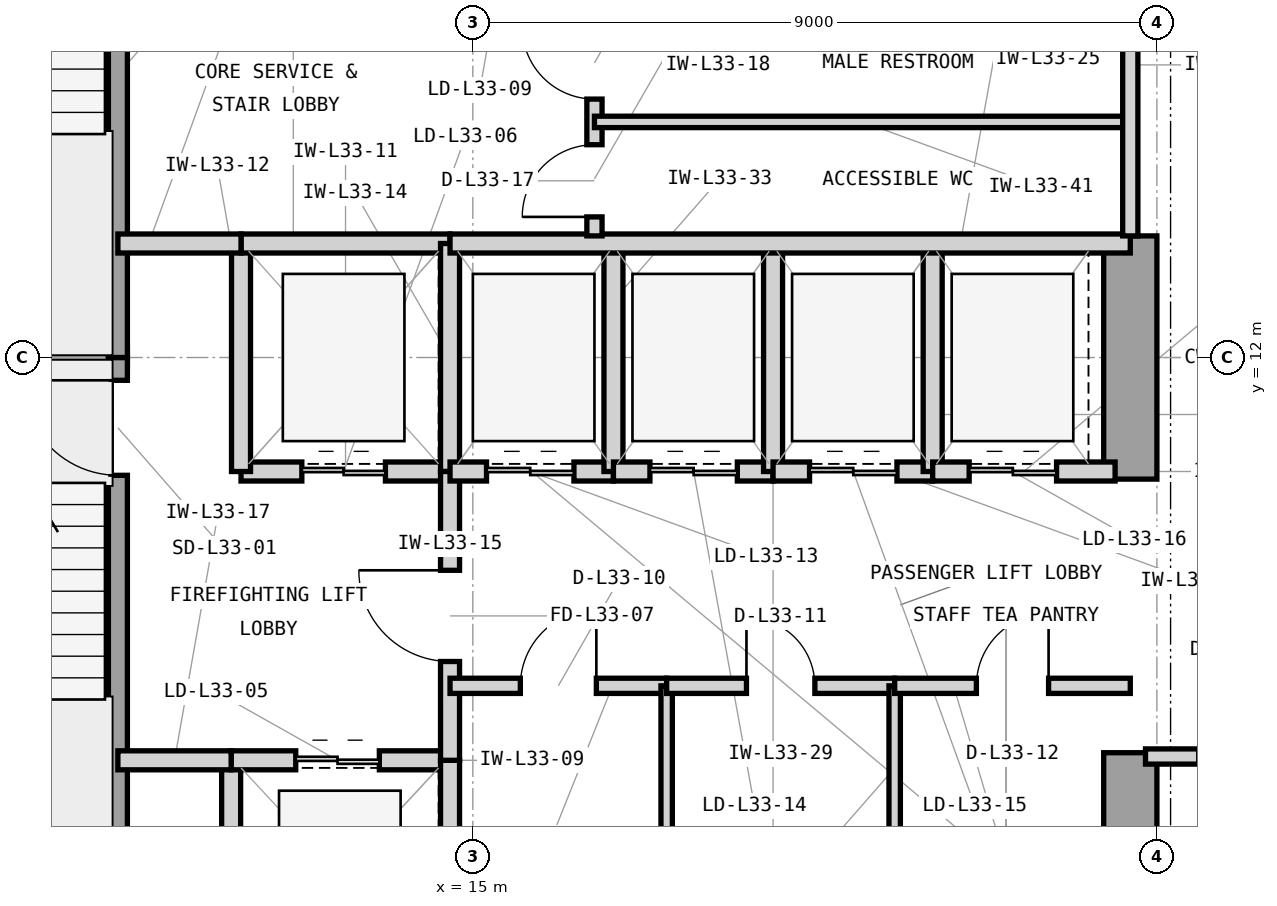
"""IFC4 building model, lengths in metres.
Left out: names, types, materials, properties, quantities, classifications, styles, units other than length and angle.
Written with IfcOpenShell. Run it as: python <this file> out.ifc"""

import sys

from ifc_helpers import new_model, si_unit, direction, frame, frame_2d, origin, place, context, subcontext, project, spatial, rectangle, extrude, element, fill, save


model = new_model("IFC4")
c1 = context("Model", 3, precision=1e-05, world=origin(), true_north=direction((0.0, 1.0)))
c2 = subcontext(c1, "Body", "Model", "MODEL_VIEW")
j1 = project(units=[si_unit("LENGTHUNIT", "METRE"), si_unit("PLANEANGLEUNIT", "RADIAN")], contexts=[c1])
p1 = place(None, origin())
s1 = spatial("IfcSite", under=j1, at=p1, CompositionType="ELEMENT")
p2 = place(p1, origin())
s2 = spatial("IfcBuilding", under=s1, at=p2, CompositionType="ELEMENT")
p3 = place(p2, frame((0.0, 0.0, 140.1)))
s3 = spatial("IfcBuildingStorey", under=s2, at=p3, CompositionType="ELEMENT", Elevation=140.1)
p4 = place(p3, frame((23.65, 3.7, 0.0), z_axis=(0.0, 0.0, 1.0), x_axis=(0.0, 1.0, 0.0)))
e1 = element("IfcWall", 1, at=p4, inside=s3, PredefinedType="SHEAR", context=c2, shape_type="SweptSolid", body=[
    extrude(rectangle(XDim=3.1, YDim=0.7, at=frame_2d((1.55, 0.0))), origin(), (0.0, 0.0, 1.0), 3.9),
])
p5 = place(p3, frame((23.65, 10.4, 0.0), z_axis=(0.0, 0.0, 1.0), x_axis=(0.0, 1.0, 0.0)))
e2 = element("IfcWall", 2, at=p5, inside=s3, PredefinedType="SHEAR", context=c2, shape_type="SweptSolid", body=[
    extrude(rectangle(XDim=3.2, YDim=0.7, at=frame_2d((1.6, 0.0))), origin(), (0.0, 0.0, 1.0), 3.9),
])
p6 = place(p3, frame((6.35, 12.0, 0.0), z_axis=(0.0, 0.0, 1.0), x_axis=(1.0, 0.0, 0.0)))
e3 = element("IfcWall", 3, at=p6, inside=s3, PredefinedType="SHEAR", context=c2, shape_type="SweptSolid", body=[
    extrude(rectangle(XDim=4.105, YDim=0.25, at=frame_2d((2.052, 0.0))), origin(), (0.0, 0.0, 1.0), 3.9),
])
p7 = place(p3, frame((10.33, 4.55, 0.0), z_axis=(0.0, 0.0, 1.0), x_axis=(0.0, 1.0, 0.0)))
e4 = element("IfcWall", 4, at=p7, inside=s3, PredefinedType="SHEAR", context=c2, shape_type="SweptSolid", body=[
    extrude(rectangle(XDim=7.45, YDim=0.25, at=frame_2d((3.725, 0.0))), origin(), (0.0, 0.0, 1.0), 3.9),
])
p8 = place(p7, frame((5.9, 0.0, 0.0)))
e5 = element("IfcOpeningElement", 5, at=p8, cuts=e4, PredefinedType="OPENING", context=c2, shape_type="SweptSolid", body=[
    extrude(rectangle(XDim=1.25, YDim=2.2, at=frame_2d((0.625, 1.1))), frame((0.0, 0.135, 0.0), z_axis=(0.0, -1.0, 0.0), x_axis=(1.0, 0.0, 0.0)), (0.0, 0.0, 1.0), 0.27),
])
p9 = place(p3, frame((10.33, 12.0, 0.0), z_axis=(0.0, 0.0, 1.0), x_axis=(0.0, 1.0, 0.0)))
e6 = element("IfcWall", 6, at=p9, inside=s3, PredefinedType="SHEAR", context=c2, shape_type="SweptSolid", body=[
    extrude(rectangle(XDim=7.45, YDim=0.25, at=frame_2d((3.725, 0.0))), origin(), (0.0, 0.0, 1.0), 3.9),
])
p10 = place(p9, frame((5.85, 0.0, 0.0)))
e7 = element("IfcOpeningElement", 7, at=p10, cuts=e6, PredefinedType="OPENING", context=c2, shape_type="SweptSolid", body=[
    extrude(rectangle(XDim=1.25, YDim=2.2, at=frame_2d((0.625, 1.1))), frame((0.0, 0.135, 0.0), z_axis=(0.0, -1.0, 0.0), x_axis=(1.0, 0.0, 0.0)), (0.0, 0.0, 1.0), 0.27),
])
p11 = place(p3, frame((11.82, 3.35, 0.0), z_axis=(0.0, 0.0, 1.0), x_axis=(0.0, 1.0, 0.0)))
e8 = element("IfcWall", 8, at=p11, inside=s3, PredefinedType="PARTITIONING", context=c2, shape_type="SweptSolid", body=[
    extrude(rectangle(XDim=3.35, YDim=0.25, at=frame_2d((1.675, 0.0))), origin(), (0.0, 0.0, 1.0), 3.69),
])
p12 = place(p3, frame((11.82, 6.7, 0.0), z_axis=(0.0, 0.0, 1.0), x_axis=(1.0, 0.0, 0.0)))
e9 = element("IfcWall", 9, at=p12, inside=s3, PredefinedType="PARTITIONING", context=c2, shape_type="SweptSolid", body=[
    extrude(rectangle(XDim=2.88, YDim=0.25, at=frame_2d((1.44, 0.0))), origin(), (0.0, 0.0, 1.0), 3.233),
])
p13 = place(p12, frame((0.85, 0.0, 0.0)))
e10 = element("IfcOpeningElement", 10, at=p13, cuts=e9, PredefinedType="OPENING", context=c2, shape_type="SweptSolid", body=[
    extrude(rectangle(XDim=1.1, YDim=2.25, at=frame_2d((0.55, 1.125))), frame((0.0, 0.135, 0.0), z_axis=(0.0, -1.0, 0.0), x_axis=(1.0, 0.0, 0.0)), (0.0, 0.0, 1.0), 0.27),
])
p14 = place(p3, frame((14.7, 3.35, 0.0), z_axis=(0.0, 0.0, 1.0), x_axis=(0.0, 1.0, 0.0)))
e11 = element("IfcWall", 11, at=p14, inside=s3, PredefinedType="PARTITIONING", context=c2, shape_type="SweptSolid", body=[
    extrude(rectangle(XDim=3.35, YDim=0.25, at=frame_2d((1.675, 0.0))), origin(), (0.0, 0.0, 1.0), 3.69),
])
p15 = place(p3, frame((11.95, 10.5, 0.0), z_axis=(0.0, 0.0, 1.0), x_axis=(1.0, 0.0, 0.0)))
e12 = element("IfcWall", 12, at=p15, inside=s3, PredefinedType="PARTITIONING", context=c2, shape_type="SweptSolid", body=[
    extrude(rectangle(XDim=2.75, YDim=0.25, at=frame_2d((1.375, 0.0))), origin(), (0.0, 0.0, 1.0), 3.233),
])
p16 = place(p15, frame((0.8, 0.0, 0.0)))
e13 = element("IfcOpeningElement", 13, at=p16, cuts=e12, PredefinedType="OPENING", context=c2, shape_type="SweptSolid", body=[
    extrude(rectangle(XDim=1.1, YDim=2.25, at=frame_2d((0.55, 1.125))), frame((0.0, 0.135, 0.0), z_axis=(0.0, -1.0, 0.0), x_axis=(1.0, 0.0, 0.0)), (0.0, 0.0, 1.0), 0.27),
])
p17 = place(p3, frame((11.95, 10.5, 0.0), z_axis=(0.0, 0.0, 1.0), x_axis=(0.0, 1.0, 0.0)))
e14 = element("IfcWall", 14, at=p17, inside=s3, PredefinedType="PARTITIONING", context=c2, shape_type="SweptSolid", body=[
    extrude(rectangle(XDim=3.0, YDim=0.25, at=frame_2d((1.5, 0.0))), origin(), (0.0, 0.0, 1.0), 3.69),
])
p18 = place(p3, frame((11.95, 13.5, 0.0), z_axis=(0.0, 0.0, 1.0), x_axis=(1.0, 0.0, 0.0)))
e15 = element("IfcWall", 15, at=p18, inside=s3, PredefinedType="PARTITIONING", context=c2, shape_type="SweptSolid", body=[
    extrude(rectangle(XDim=2.75, YDim=0.25, at=frame_2d((1.375, 0.0))), origin(), (0.0, 0.0, 1.0), 3.233),
])
p19 = place(p3, frame((14.7, 10.5, 0.0), z_axis=(0.0, 0.0, 1.0), x_axis=(0.0, 1.0, 0.0)))
e16 = element("IfcWall", 16, at=p19, inside=s3, PredefinedType="PARTITIONING", context=c2, shape_type="SweptSolid", body=[
    extrude(rectangle(XDim=3.0, YDim=0.25, at=frame_2d((1.5, 0.0))), origin(), (0.0, 0.0, 1.0), 3.69),
])
p20 = place(p3, frame((14.7, 6.7, 0.0), z_axis=(0.0, 0.0, 1.0), x_axis=(0.0, 1.0, 0.0)))
e17 = element("IfcWall", 17, at=p20, inside=s3, PredefinedType="PARTITIONING", context=c2, shape_type="SweptSolid", body=[
    extrude(rectangle(XDim=3.8, YDim=0.25, at=frame_2d((1.9, 0.0))), origin(), (0.0, 0.0, 1.0), 3.69),
])
p21 = place(p20, frame((1.3, 0.0, 0.0)))
e18 = element("IfcOpeningElement", 18, at=p21, cuts=e17, PredefinedType="OPENING", context=c2, shape_type="SweptSolid", body=[
    extrude(rectangle(XDim=1.2, YDim=2.2, at=frame_2d((0.6, 1.1))), frame((0.0, 0.135, 0.0), z_axis=(0.0, -1.0, 0.0), x_axis=(1.0, 0.0, 0.0)), (0.0, 0.0, 1.0), 0.27),
])
p22 = place(p3, frame((10.33, 13.5, 0.0), z_axis=(0.0, 0.0, 1.0), x_axis=(1.0, 0.0, 0.0)))
e19 = element("IfcWall", 19, at=p22, inside=s3, PredefinedType="PARTITIONING", context=c2, shape_type="SweptSolid", body=[
    extrude(rectangle(XDim=1.62, YDim=0.25, at=frame_2d((0.81, 0.0))), origin(), (0.0, 0.0, 1.0), 3.233),
])
p23 = place(p3, frame((10.33, 6.7, 0.0), z_axis=(0.0, 0.0, 1.0), x_axis=(1.0, 0.0, 0.0)))
e20 = element("IfcWall", 20, at=p23, inside=s3, PredefinedType="PARTITIONING", context=c2, shape_type="SweptSolid", body=[
    extrude(rectangle(XDim=1.49, YDim=0.25, at=frame_2d((0.745, 0.0))), origin(), (0.0, 0.0, 1.0), 3.233),
])
p24 = place(p3, frame((14.7, 7.68, 0.0), z_axis=(0.0, 0.0, 1.0), x_axis=(1.0, 0.0, 0.0)))
e21 = element("IfcWall", 21, at=p24, inside=s3, PredefinedType="PARTITIONING", context=c2, shape_type="SweptSolid", body=[
    extrude(rectangle(XDim=2.85, YDim=0.2, at=frame_2d((1.425, 0.0))), origin(), (0.0, 0.0, 1.0), 3.69),
])
p25 = place(p24, frame((0.925, 0.0, 0.0)))
e22 = element("IfcOpeningElement", 22, at=p25, cuts=e21, PredefinedType="OPENING", context=c2, shape_type="SweptSolid", body=[
    extrude(rectangle(XDim=1.0, YDim=2.15, at=frame_2d((0.5, 1.075))), frame((0.0, 0.11, 0.0), z_axis=(0.0, -1.0, 0.0), x_axis=(1.0, 0.0, 0.0)), (0.0, 0.0, 1.0), 0.22),
])
p26 = place(p3, frame((17.55, 3.35, 0.0), z_axis=(0.0, 0.0, 1.0), x_axis=(0.0, 1.0, 0.0)))
e23 = element("IfcWall", 23, at=p26, inside=s3, PredefinedType="PARTITIONING", context=c2, shape_type="SweptSolid", body=[
    extrude(rectangle(XDim=4.33, YDim=0.15, at=frame_2d((2.165, 0.0))), origin(), (0.0, 0.0, 1.0), 3.69),
])
p27 = place(p3, frame((17.55, 7.68, 0.0), z_axis=(0.0, 0.0, 1.0), x_axis=(1.0, 0.0, 0.0)))
e24 = element("IfcWall", 24, at=p27, inside=s3, PredefinedType="PARTITIONING", context=c2, shape_type="SweptSolid", body=[
    extrude(rectangle(XDim=3.0, YDim=0.2, at=frame_2d((1.5, 0.0))), origin(), (0.0, 0.0, 1.0), 3.69),
])
p28 = place(p27, frame((1.05, 0.0, 0.0)))
e25 = element("IfcOpeningElement", 25, at=p28, cuts=e24, PredefinedType="OPENING", context=c2, shape_type="SweptSolid", body=[
    extrude(rectangle(XDim=0.9, YDim=2.1, at=frame_2d((0.45, 1.05))), frame((0.0, 0.11, 0.0), z_axis=(0.0, -1.0, 0.0), x_axis=(1.0, 0.0, 0.0)), (0.0, 0.0, 1.0), 0.22),
])
p29 = place(p3, frame((20.55, 3.35, 0.0), z_axis=(0.0, 0.0, 1.0), x_axis=(0.0, 1.0, 0.0)))
e26 = element("IfcWall", 26, at=p29, inside=s3, PredefinedType="PARTITIONING", context=c2, shape_type="SweptSolid", body=[
    extrude(rectangle(XDim=4.33, YDim=0.15, at=frame_2d((2.165, 0.0))), origin(), (0.0, 0.0, 1.0), 3.69),
])
p30 = place(p3, frame((20.55, 7.68, 0.0), z_axis=(0.0, 0.0, 1.0), x_axis=(1.0, 0.0, 0.0)))
e27 = element("IfcWall", 27, at=p30, inside=s3, PredefinedType="PARTITIONING", context=c2, shape_type="SweptSolid", body=[
    extrude(rectangle(XDim=3.1, YDim=0.2, at=frame_2d((1.55, 0.0))), origin(), (0.0, 0.0, 1.0), 3.69),
])
p31 = place(p30, frame((1.075, 0.0, 0.0)))
e28 = element("IfcOpeningElement", 28, at=p31, cuts=e27, PredefinedType="OPENING", context=c2, shape_type="SweptSolid", body=[
    extrude(rectangle(XDim=0.95, YDim=2.1, at=frame_2d((0.475, 1.05))), frame((0.0, 0.11, 0.0), z_axis=(0.0, -1.0, 0.0), x_axis=(1.0, 0.0, 0.0)), (0.0, 0.0, 1.0), 0.22),
])
p32 = place(p3, frame((14.7, 10.5, 0.0), z_axis=(0.0, 0.0, 1.0), x_axis=(1.0, 0.0, 0.0)))
e29 = element("IfcWall", 29, at=p32, inside=s3, PredefinedType="PARTITIONING", context=c2, shape_type="SweptSolid", body=[
    extrude(rectangle(XDim=2.15, YDim=0.25, at=frame_2d((1.075, 0.0))), origin(), (0.0, 0.0, 1.0), 3.233),
])
p33 = place(p32, frame((0.48, 0.0, 0.0)))
e30 = element("IfcOpeningElement", 30, at=p33, cuts=e29, PredefinedType="OPENING", context=c2, shape_type="SweptSolid", body=[
    extrude(rectangle(XDim=1.15, YDim=2.25, at=frame_2d((0.575, 1.125))), frame((0.0, 0.135, 0.0), z_axis=(0.0, -1.0, 0.0), x_axis=(1.0, 0.0, 0.0)), (0.0, 0.0, 1.0), 0.27),
])
p34 = place(p3, frame((16.85, 10.5, 0.0), z_axis=(0.0, 0.0, 1.0), x_axis=(0.0, 1.0, 0.0)))
e31 = element("IfcWall", 31, at=p34, inside=s3, PredefinedType="PARTITIONING", context=c2, shape_type="SweptSolid", body=[
    extrude(rectangle(XDim=3.0, YDim=0.25, at=frame_2d((1.5, 0.0))), origin(), (0.0, 0.0, 1.0), 3.69),
])
p35 = place(p3, frame((16.85, 10.5, 0.0), z_axis=(0.0, 0.0, 1.0), x_axis=(1.0, 0.0, 0.0)))
e32 = element("IfcWall", 32, at=p35, inside=s3, PredefinedType="PARTITIONING", context=c2, shape_type="SweptSolid", body=[
    extrude(rectangle(XDim=2.1, YDim=0.25, at=frame_2d((1.05, 0.0))), origin(), (0.0, 0.0, 1.0), 3.233),
])
p36 = place(p35, frame((0.48, 0.0, 0.0)))
e33 = element("IfcOpeningElement", 33, at=p36, cuts=e32, PredefinedType="OPENING", context=c2, shape_type="SweptSolid", body=[
    extrude(rectangle(XDim=1.15, YDim=2.25, at=frame_2d((0.575, 1.125))), frame((0.0, 0.135, 0.0), z_axis=(0.0, -1.0, 0.0), x_axis=(1.0, 0.0, 0.0)), (0.0, 0.0, 1.0), 0.27),
])
p37 = place(p3, frame((18.95, 10.5, 0.0), z_axis=(0.0, 0.0, 1.0), x_axis=(0.0, 1.0, 0.0)))
e34 = element("IfcWall", 34, at=p37, inside=s3, PredefinedType="PARTITIONING", context=c2, shape_type="SweptSolid", body=[
    extrude(rectangle(XDim=3.0, YDim=0.25, at=frame_2d((1.5, 0.0))), origin(), (0.0, 0.0, 1.0), 3.69),
])
p38 = place(p3, frame((18.95, 10.5, 0.0), z_axis=(0.0, 0.0, 1.0), x_axis=(1.0, 0.0, 0.0)))
e35 = element("IfcWall", 35, at=p38, inside=s3, PredefinedType="PARTITIONING", context=c2, shape_type="SweptSolid", body=[
    extrude(rectangle(XDim=2.1, YDim=0.25, at=frame_2d((1.05, 0.0))), origin(), (0.0, 0.0, 1.0), 3.233),
])
p39 = place(p38, frame((0.48, 0.0, 0.0)))
e36 = element("IfcOpeningElement", 36, at=p39, cuts=e35, PredefinedType="OPENING", context=c2, shape_type="SweptSolid", body=[
    extrude(rectangle(XDim=1.15, YDim=2.25, at=frame_2d((0.575, 1.125))), frame((0.0, 0.135, 0.0), z_axis=(0.0, -1.0, 0.0), x_axis=(1.0, 0.0, 0.0)), (0.0, 0.0, 1.0), 0.27),
])
p40 = place(p3, frame((21.05, 10.5, 0.0), z_axis=(0.0, 0.0, 1.0), x_axis=(0.0, 1.0, 0.0)))
e37 = element("IfcWall", 37, at=p40, inside=s3, PredefinedType="PARTITIONING", context=c2, shape_type="SweptSolid", body=[
    extrude(rectangle(XDim=3.0, YDim=0.25, at=frame_2d((1.5, 0.0))), origin(), (0.0, 0.0, 1.0), 3.69),
])
p41 = place(p3, frame((21.05, 10.5, 0.0), z_axis=(0.0, 0.0, 1.0), x_axis=(1.0, 0.0, 0.0)))
e38 = element("IfcWall", 38, at=p41, inside=s3, PredefinedType="PARTITIONING", context=c2, shape_type="SweptSolid", body=[
    extrude(rectangle(XDim=2.4, YDim=0.25, at=frame_2d((1.2, 0.0))), origin(), (0.0, 0.0, 1.0), 3.233),
])
p42 = place(p41, frame((0.48, 0.0, 0.0)))
e39 = element("IfcOpeningElement", 39, at=p42, cuts=e38, PredefinedType="OPENING", context=c2, shape_type="SweptSolid", body=[
    extrude(rectangle(XDim=1.15, YDim=2.25, at=frame_2d((0.575, 1.125))), frame((0.0, 0.135, 0.0), z_axis=(0.0, -1.0, 0.0), x_axis=(1.0, 0.0, 0.0)), (0.0, 0.0, 1.0), 0.27),
])
p43 = place(p3, frame((14.7, 13.5, 0.0), z_axis=(0.0, 0.0, 1.0), x_axis=(1.0, 0.0, 0.0)))
e40 = element("IfcWall", 40, at=p43, inside=s3, PredefinedType="PARTITIONING", context=c2, shape_type="SweptSolid", body=[
    extrude(rectangle(XDim=8.95, YDim=0.25, at=frame_2d((4.475, 0.0))), origin(), (0.0, 0.0, 1.0), 3.233),
])
p44 = place(p3, frame((16.6, 13.6, 0.0), z_axis=(0.0, 0.0, 1.0), x_axis=(0.0, 1.0, 0.0)))
e41 = element("IfcWall", 41, at=p44, inside=s3, PredefinedType="PARTITIONING", context=c2, shape_type="SweptSolid", body=[
    extrude(rectangle(XDim=3.0, YDim=0.2, at=frame_2d((1.5, 0.0))), origin(), (0.0, 0.0, 1.0), 3.69),
])
p45 = place(p44, frame((0.25, 0.0, 0.0)))
e42 = element("IfcOpeningElement", 42, at=p45, cuts=e41, PredefinedType="OPENING", context=c2, shape_type="SweptSolid", body=[
    extrude(rectangle(XDim=0.95, YDim=2.1, at=frame_2d((0.475, 1.05))), frame((0.0, 0.11, 0.0), z_axis=(0.0, -1.0, 0.0), x_axis=(1.0, 0.0, 0.0)), (0.0, 0.0, 1.0), 0.22),
])
p46 = place(p44, frame((1.8, 0.0, 0.0)))
e43 = element("IfcOpeningElement", 43, at=p46, cuts=e41, PredefinedType="OPENING", context=c2, shape_type="SweptSolid", body=[
    extrude(rectangle(XDim=0.95, YDim=2.1, at=frame_2d((0.475, 1.05))), frame((0.0, 0.11, 0.0), z_axis=(0.0, -1.0, 0.0), x_axis=(1.0, 0.0, 0.0)), (0.0, 0.0, 1.0), 0.22),
])
p47 = place(p3, frame((16.6, 15.1, 0.0), z_axis=(0.0, 0.0, 1.0), x_axis=(1.0, 0.0, 0.0)))
e44 = element("IfcWall", 44, at=p47, inside=s3, PredefinedType="PARTITIONING", context=c2, shape_type="SweptSolid", body=[
    extrude(rectangle(XDim=7.05, YDim=0.15, at=frame_2d((3.525, 0.0))), origin(), (0.0, 0.0, 1.0), 3.69),
])
p48 = place(p3, frame((23.65, 13.6, 0.0), z_axis=(0.0, 0.0, 1.0), x_axis=(0.0, 1.0, 0.0)))
e45 = element("IfcWall", 45, at=p48, inside=s3, PredefinedType="PARTITIONING", context=c2, shape_type="SweptSolid", body=[
    extrude(rectangle(XDim=3.0, YDim=0.2, at=frame_2d((1.5, 0.0))), origin(), (0.0, 0.0, 1.0), 3.69),
])
p49 = place(p3, frame((23.85, 6.75, 0.0), z_axis=(0.0, 0.0, 1.0), x_axis=(1.0, 0.0, 0.0)))
e46 = element("IfcWall", 46, at=p49, inside=s3, PredefinedType="PARTITIONING", context=c2, shape_type="SweptSolid", body=[
    extrude(rectangle(XDim=2.85, YDim=0.2, at=frame_2d((1.425, 0.0))), origin(), (0.0, 0.0, 1.0), 3.69),
])
p50 = place(p49, frame((0.7, 0.0, 0.0)))
e47 = element("IfcOpeningElement", 47, at=p50, cuts=e46, PredefinedType="OPENING", context=c2, shape_type="SweptSolid", body=[
    extrude(rectangle(XDim=1.0, YDim=2.15, at=frame_2d((0.5, 1.075))), frame((0.0, 0.11, 0.0), z_axis=(0.0, -1.0, 0.0), x_axis=(1.0, 0.0, 0.0)), (0.0, 0.0, 1.0), 0.22),
])
p51 = place(p8, origin())
e48 = element("IfcDoor", 48, at=p51, inside=s3, OperationType="SINGLE_SWING_RIGHT", PredefinedType="DOOR", context=c2, shape_type="SweptSolid", body=[
    extrude(rectangle(XDim=1.25, YDim=2.2, at=frame_2d((0.625, 1.1))), frame((0.0, 0.025, 0.0), z_axis=(0.0, -1.0, 0.0), x_axis=(1.0, 0.0, 0.0)), (0.0, 0.0, 1.0), 0.05),
])
fill(e5, e48)
p52 = place(p13, origin())
e49 = element("IfcDoor", 49, at=p52, inside=s3, OperationType="DOUBLE_DOOR_SLIDING", PredefinedType="DOOR", context=c2, shape_type="SweptSolid", body=[
    extrude(rectangle(XDim=1.1, YDim=2.25, at=frame_2d((0.55, 1.125))), frame((0.0, 0.025, 0.0), z_axis=(0.0, -1.0, 0.0), x_axis=(1.0, 0.0, 0.0)), (0.0, 0.0, 1.0), 0.05),
])
fill(e10, e49)
p53 = place(p16, origin())
e50 = element("IfcDoor", 50, at=p53, inside=s3, OperationType="DOUBLE_DOOR_SLIDING", PredefinedType="DOOR", context=c2, shape_type="SweptSolid", body=[
    extrude(rectangle(XDim=1.1, YDim=2.25, at=frame_2d((0.55, 1.125))), frame((0.0, 0.025, 0.0), z_axis=(0.0, -1.0, 0.0), x_axis=(1.0, 0.0, 0.0)), (0.0, 0.0, 1.0), 0.05),
])
fill(e13, e50)
p54 = place(p21, origin())
e51 = element("IfcDoor", 51, at=p54, inside=s3, OperationType="SINGLE_SWING_RIGHT", PredefinedType="DOOR", context=c2, shape_type="SweptSolid", body=[
    extrude(rectangle(XDim=1.2, YDim=2.2, at=frame_2d((0.6, 1.1))), frame((0.0, 0.025, 0.0), z_axis=(0.0, -1.0, 0.0), x_axis=(1.0, 0.0, 0.0)), (0.0, 0.0, 1.0), 0.05),
])
fill(e18, e51)
p55 = place(p25, origin())
e52 = element("IfcDoor", 52, at=p55, inside=s3, OperationType="SINGLE_SWING_RIGHT", PredefinedType="DOOR", context=c2, shape_type="SweptSolid", body=[
    extrude(rectangle(XDim=1.0, YDim=2.15, at=frame_2d((0.5, 1.075))), frame((0.0, 0.025, 0.0), z_axis=(0.0, -1.0, 0.0), x_axis=(1.0, 0.0, 0.0)), (0.0, 0.0, 1.0), 0.05),
])
fill(e22, e52)
p56 = place(p28, origin())
e53 = element("IfcDoor", 53, at=p56, inside=s3, OperationType="SINGLE_SWING_LEFT", PredefinedType="TRAPDOOR", context=c2, shape_type="SweptSolid", body=[
    extrude(rectangle(XDim=0.9, YDim=2.1, at=frame_2d((0.45, 1.05))), frame((0.0, 0.025, 0.0), z_axis=(0.0, -1.0, 0.0), x_axis=(1.0, 0.0, 0.0)), (0.0, 0.0, 1.0), 0.05),
])
fill(e25, e53)
p57 = place(p31, origin())
e54 = element("IfcDoor", 54, at=p57, inside=s3, OperationType="SINGLE_SWING_RIGHT", PredefinedType="DOOR", context=c2, shape_type="SweptSolid", body=[
    extrude(rectangle(XDim=0.95, YDim=2.1, at=frame_2d((0.475, 1.05))), frame((0.0, 0.025, 0.0), z_axis=(0.0, -1.0, 0.0), x_axis=(1.0, 0.0, 0.0)), (0.0, 0.0, 1.0), 0.05),
])
fill(e28, e54)
p58 = place(p33, origin())
e55 = element("IfcDoor", 55, at=p58, inside=s3, OperationType="DOUBLE_DOOR_SLIDING", PredefinedType="DOOR", context=c2, shape_type="SweptSolid", body=[
    extrude(rectangle(XDim=1.15, YDim=2.25, at=frame_2d((0.575, 1.125))), frame((0.0, 0.025, 0.0), z_axis=(0.0, -1.0, 0.0), x_axis=(1.0, 0.0, 0.0)), (0.0, 0.0, 1.0), 0.05),
])
fill(e30, e55)
p59 = place(p36, origin())
e56 = element("IfcDoor", 56, at=p59, inside=s3, OperationType="DOUBLE_DOOR_SLIDING", PredefinedType="DOOR", context=c2, shape_type="SweptSolid", body=[
    extrude(rectangle(XDim=1.15, YDim=2.25, at=frame_2d((0.575, 1.125))), frame((0.0, 0.025, 0.0), z_axis=(0.0, -1.0, 0.0), x_axis=(1.0, 0.0, 0.0)), (0.0, 0.0, 1.0), 0.05),
])
fill(e33, e56)
p60 = place(p39, origin())
e57 = element("IfcDoor", 57, at=p60, inside=s3, OperationType="DOUBLE_DOOR_SLIDING", PredefinedType="DOOR", context=c2, shape_type="SweptSolid", body=[
    extrude(rectangle(XDim=1.15, YDim=2.25, at=frame_2d((0.575, 1.125))), frame((0.0, 0.025, 0.0), z_axis=(0.0, -1.0, 0.0), x_axis=(1.0, 0.0, 0.0)), (0.0, 0.0, 1.0), 0.05),
])
fill(e36, e57)
p61 = place(p42, origin())
e58 = element("IfcDoor", 58, at=p61, inside=s3, OperationType="DOUBLE_DOOR_SLIDING", PredefinedType="DOOR", context=c2, shape_type="SweptSolid", body=[
    extrude(rectangle(XDim=1.15, YDim=2.25, at=frame_2d((0.575, 1.125))), frame((0.0, 0.025, 0.0), z_axis=(0.0, -1.0, 0.0), x_axis=(1.0, 0.0, 0.0)), (0.0, 0.0, 1.0), 0.05),
])
fill(e39, e58)
p62 = place(p45, origin())
e59 = element("IfcDoor", 59, at=p62, inside=s3, OperationType="SINGLE_SWING_LEFT", PredefinedType="DOOR", context=c2, shape_type="SweptSolid", body=[
    extrude(rectangle(XDim=0.95, YDim=2.1, at=frame_2d((0.475, 1.05))), frame((0.0, 0.025, 0.0), z_axis=(0.0, -1.0, 0.0), x_axis=(1.0, 0.0, 0.0)), (0.0, 0.0, 1.0), 0.05),
])
fill(e42, e59)
p63 = place(p46, origin())
e60 = element("IfcDoor", 60, at=p63, inside=s3, OperationType="SINGLE_SWING_RIGHT", PredefinedType="DOOR", context=c2, shape_type="SweptSolid", body=[
    extrude(rectangle(XDim=0.95, YDim=2.1, at=frame_2d((0.475, 1.05))), frame((0.0, 0.025, 0.0), z_axis=(0.0, -1.0, 0.0), x_axis=(1.0, 0.0, 0.0)), (0.0, 0.0, 1.0), 0.05),
])
fill(e43, e60)
save(model, sys.argv[1])
